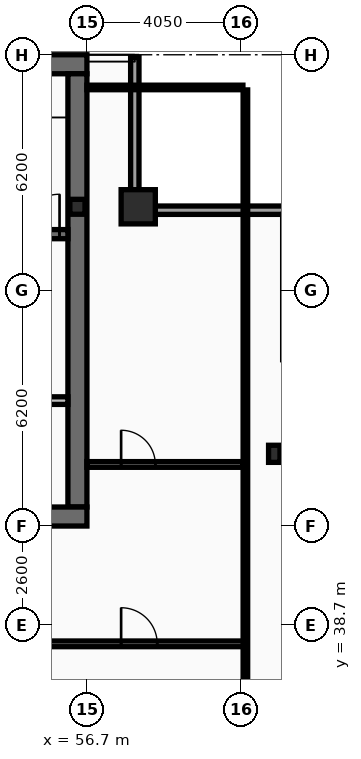
"""IFC4 building model, lengths in metres.
Left out: names, types, materials, properties, quantities, classifications, styles, units other than length and angle.
Written with IfcOpenShell. Run it as: python <this file> out.ifc"""

import sys

from ifc_helpers import new_model, si_unit, direction, frame, frame_2d, origin, origin_2d, place, context, subcontext, project, spatial, rectangle, hollow_rectangle, i_section, extrude, element, fill, save


model = new_model("IFC4")
c1 = context("Model", 3, precision=1e-05, world=origin(), true_north=direction((0.0, 1.0)))
c2 = subcontext(c1, "Body", "Model", "MODEL_VIEW")
j1 = project(units=[si_unit("LENGTHUNIT", "METRE"), si_unit("PLANEANGLEUNIT", "RADIAN")], contexts=[c1])
p1 = place(None, origin())
s1 = spatial("IfcSite", under=j1, at=p1, CompositionType="ELEMENT")
p2 = place(p1, origin())
s2 = spatial("IfcBuilding", under=s1, at=p2, CompositionType="ELEMENT")
p3 = place(p2, frame((0.0, 0.0, 298.6)))
s3 = spatial("IfcBuildingStorey", under=s2, at=p3, CompositionType="ELEMENT", Elevation=298.6)
p4 = place(p3, frame((16.2, 53.45, 0.0), z_axis=(0.0, 0.0, 1.0), x_axis=(1.0, 0.0, 0.0)))
e1 = element("IfcWall", 1, at=p4, inside=s3, PredefinedType="SHEAR", context=c2, shape_type="SweptSolid", body=[
    extrude(rectangle(XDim=40.5, YDim=0.5, at=frame_2d((20.25, 0.0))), origin(), (0.0, 0.0, 1.0), 3.44),
])
p5 = place(p3, frame((56.45, 53.2, 0.0), z_axis=(0.0, 0.0, 1.0), x_axis=(0.0, -1.0, 0.0)))
e2 = element("IfcWall", 2, at=p5, inside=s3, PredefinedType="SHEAR", context=c2, shape_type="SweptSolid", body=[
    extrude(rectangle(XDim=11.4, YDim=0.5, at=frame_2d((5.7, 0.0))), origin(), (0.0, 0.0, 1.0), 3.44),
])
p6 = place(p3, frame((56.7, 41.55, 0.0), z_axis=(0.0, 0.0, 1.0), x_axis=(-1.0, 0.0, 0.0)))
e3 = element("IfcWall", 3, at=p6, inside=s3, PredefinedType="SHEAR", context=c2, shape_type="SweptSolid", body=[
    extrude(rectangle(XDim=2.45, YDim=0.5, at=frame_2d((1.225, 0.0))), origin(), (0.0, 0.0, 1.0), 3.44),
])
p7 = place(p3, frame((48.63, 48.98, 0.0), z_axis=(0.0, 0.0, 1.0), x_axis=(1.0, 0.0, 0.0)))
e4 = element("IfcWall", 4, at=p7, inside=s3, PredefinedType="SHEAR", context=c2, shape_type="SweptSolid", body=[
    extrude(rectangle(XDim=7.57, YDim=0.24, at=frame_2d((3.785, 0.0))), origin(), (0.0, 0.0, 1.0), 3.44),
])
p8 = place(p7, frame((6.3, 0.0, 0.0)))
e5 = element("IfcOpeningElement", 5, at=p8, cuts=e4, PredefinedType="OPENING", context=c2, shape_type="SweptSolid", body=[
    extrude(rectangle(XDim=1.05, YDim=2.15, at=frame_2d((0.525, 1.075))), frame((0.0, 0.13, 0.0), z_axis=(0.0, -1.0, 0.0), x_axis=(1.0, 0.0, 0.0)), (0.0, 0.0, 1.0), 0.26),
])
p9 = place(p3, frame((58.05, 49.7, 0.0), z_axis=(0.0, 0.0, 1.0), x_axis=(1.0, 0.0, 0.0)))
e6 = element("IfcColumn", 6, at=p9, inside=s3, PredefinedType="COLUMN", context=c2, shape_type="SweptSolid", body=[
    extrude(hollow_rectangle(XDim=0.9, YDim=0.9, WallThickness=0.05, at=origin_2d()), origin(), (0.0, 0.0, 1.0), 3.6),
])
p10 = place(p3, frame((61.63, 43.2, 0.0), z_axis=(0.0, 0.0, 1.0), x_axis=(1.0, 0.0, 0.0)))
e7 = element("IfcColumn", 7, at=p10, inside=s3, PredefinedType="COLUMN", context=c2, shape_type="SweptSolid", body=[
    extrude(i_section(OverallWidth=0.3, OverallDepth=0.45, WebThickness=0.014, FlangeThickness=0.026, at=origin_2d()), origin(), (0.0, 0.0, 1.0), 3.6),
])
p11 = place(p3, frame((56.45, 49.7, 0.0), z_axis=(0.0, 0.0, 1.0), x_axis=(1.0, 0.0, 0.0)))
e8 = element("IfcColumn", 8, at=p11, inside=s3, PredefinedType="COLUMN", context=c2, shape_type="SweptSolid", body=[
    extrude(i_section(OverallWidth=0.399, OverallDepth=0.393, WebThickness=0.023, FlangeThickness=0.037, at=origin_2d()), origin(), (0.0, 0.0, 1.0), 3.6),
])
p12 = place(p3, frame((57.96, 53.63, 0.0), z_axis=(0.0, 0.0, 1.0), x_axis=(0.0, -1.0, 0.0)))
e9 = element("IfcWall", 9, at=p12, inside=s3, PredefinedType="SOLIDWALL", context=c2, shape_type="SweptSolid", body=[
    extrude(rectangle(XDim=3.91, YDim=0.22, at=frame_2d((1.955, 0.0))), origin(), (0.0, 0.0, 1.0), 2.88),
])
p13 = place(p3, frame((57.85, 49.61, 0.0), z_axis=(0.0, 0.0, 1.0), x_axis=(1.0, 0.0, 0.0)))
e10 = element("IfcWall", 10, at=p13, inside=s3, PredefinedType="SOLIDWALL", context=c2, shape_type="SweptSolid", body=[
    extrude(rectangle(XDim=4.22, YDim=0.22, at=frame_2d((2.11, 0.0))), origin(), (0.0, 0.0, 1.0), 2.88),
])
p14 = place(p3, frame((51.9, 44.6, 0.0), z_axis=(0.0, 0.0, 1.0), x_axis=(1.0, 0.0, 0.0)))
e11 = element("IfcWall", 11, at=p14, inside=s3, PredefinedType="PARTITIONING", context=c2, shape_type="SweptSolid", body=[
    extrude(rectangle(XDim=4.3, YDim=0.2, at=frame_2d((2.15, 0.0))), origin(), (0.0, 0.0, 1.0), 3.44),
])
p15 = place(p14, frame((1.15, 0.0, 0.0)))
e12 = element("IfcOpeningElement", 12, at=p15, cuts=e11, PredefinedType="OPENING", context=c2, shape_type="SweptSolid", body=[
    extrude(rectangle(XDim=1.05, YDim=2.15, at=frame_2d((0.525, 1.075))), frame((0.0, 0.11, 0.0), z_axis=(0.0, -1.0, 0.0), x_axis=(1.0, 0.0, 0.0)), (0.0, 0.0, 1.0), 0.22),
])
p16 = place(p3, frame((54.35, 38.2, 0.0), z_axis=(0.0, 0.0, 1.0), x_axis=(1.0, 0.0, 0.0)))
e13 = element("IfcWall", 13, at=p16, inside=s3, PredefinedType="PARTITIONING", context=c2, shape_type="SweptSolid", body=[
    extrude(rectangle(XDim=6.52, YDim=0.15, at=frame_2d((3.26, 0.0))), origin(), (0.0, 0.0, 1.0), 2.78),
])
p17 = place(p16, frame((3.25, 0.0, 0.0)))
e14 = element("IfcOpeningElement", 14, at=p17, cuts=e13, PredefinedType="OPENING", context=c2, shape_type="SweptSolid", body=[
    extrude(rectangle(XDim=0.95, YDim=2.05, at=frame_2d((0.475, 1.025))), frame((0.0, 0.085, 0.0), z_axis=(0.0, -1.0, 0.0), x_axis=(1.0, 0.0, 0.0)), (0.0, 0.0, 1.0), 0.17),
])
p18 = place(p3, frame((56.7, 42.92, 0.0), z_axis=(0.0, 0.0, 1.0), x_axis=(1.0, 0.0, 0.0)))
e15 = element("IfcWall", 15, at=p18, inside=s3, PredefinedType="PARTITIONING", context=c2, shape_type="SweptSolid", body=[
    extrude(rectangle(XDim=4.105, YDim=0.15, at=frame_2d((2.052, 0.0))), origin(), (0.0, 0.0, 1.0), 2.78),
])
p19 = place(p18, frame((0.9, 0.0, 0.0)))
e16 = element("IfcOpeningElement", 16, at=p19, cuts=e15, PredefinedType="OPENING", context=c2, shape_type="SweptSolid", body=[
    extrude(rectangle(XDim=0.9, YDim=2.05, at=frame_2d((0.45, 1.025))), frame((0.0, 0.085, 0.0), z_axis=(0.0, -1.0, 0.0), x_axis=(1.0, 0.0, 0.0)), (0.0, 0.0, 1.0), 0.17),
])
p20 = place(p3, frame((60.87, 10.665, 0.0), z_axis=(0.0, 0.0, 1.0), x_axis=(0.0, 1.0, 0.0)))
e17 = element("IfcWall", 17, at=p20, inside=s3, PredefinedType="PARTITIONING", context=c2, shape_type="SweptSolid", body=[
    extrude(rectangle(XDim=42.11, YDim=0.12, at=frame_2d((21.055, 0.0))), origin(), (0.0, 0.0, 1.0), 2.78),
])
p21 = place(p3, frame((56.7, 52.84, 0.0), z_axis=(0.0, 0.0, 1.0), x_axis=(1.0, 0.0, 0.0)))
e18 = element("IfcWall", 18, at=p21, inside=s3, PredefinedType="PARTITIONING", context=c2, shape_type="SweptSolid", body=[
    extrude(rectangle(XDim=4.105, YDim=0.12, at=frame_2d((2.052, 0.0))), origin(), (0.0, 0.0, 1.0), 3.44),
])
p22 = place(p8, origin())
e19 = element("IfcDoor", 19, at=p22, inside=s3, OperationType="SINGLE_SWING_RIGHT", PredefinedType="DOOR", context=c2, shape_type="SweptSolid", body=[
    extrude(rectangle(XDim=1.05, YDim=2.15, at=frame_2d((0.525, 1.075))), frame((0.0, 0.025, 0.0), z_axis=(0.0, -1.0, 0.0), x_axis=(1.0, 0.0, 0.0)), (0.0, 0.0, 1.0), 0.05),
])
fill(e5, e19)
p23 = place(p17, origin())
e20 = element("IfcDoor", 20, at=p23, inside=s3, OperationType="SINGLE_SWING_LEFT", PredefinedType="DOOR", context=c2, shape_type="SweptSolid", body=[
    extrude(rectangle(XDim=0.95, YDim=2.05, at=frame_2d((0.475, 1.025))), frame((0.0, 0.025, 0.0), z_axis=(0.0, -1.0, 0.0), x_axis=(1.0, 0.0, 0.0)), (0.0, 0.0, 1.0), 0.05),
])
fill(e14, e20)
p24 = place(p19, origin())
e21 = element("IfcDoor", 21, at=p24, inside=s3, OperationType="SINGLE_SWING_LEFT", PredefinedType="DOOR", context=c2, shape_type="SweptSolid", body=[
    extrude(rectangle(XDim=0.9, YDim=2.05, at=frame_2d((0.45, 1.025))), frame((0.0, 0.025, 0.0), z_axis=(0.0, -1.0, 0.0), x_axis=(1.0, 0.0, 0.0)), (0.0, 0.0, 1.0), 0.05),
])
fill(e16, e21)
save(model, sys.argv[1])
